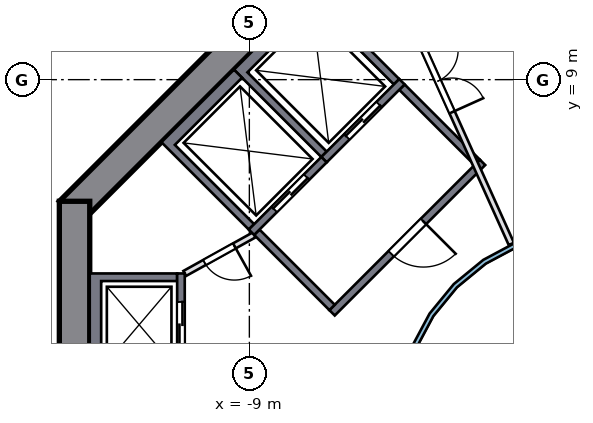
"""IFC4 building model, lengths in metres.
Left out: names, types, materials, properties, quantities, classifications, styles, units other than length and angle.
Written with IfcOpenShell. Run it as: python <this file> out.ifc"""

import sys

from ifc_helpers import new_model, si_unit, direction, frame, frame_2d, origin, place, context, subcontext, project, spatial, polyline, rectangle, outline, extrude, element, fill, save


model = new_model("IFC4")
c1 = context("Model", 3, precision=1e-05, world=origin(), true_north=direction((0.0, 1.0)))
c2 = subcontext(c1, "Body", "Model", "MODEL_VIEW")
j1 = project(units=[si_unit("LENGTHUNIT", "METRE"), si_unit("PLANEANGLEUNIT", "RADIAN")], contexts=[c1])
p1 = place(None, origin())
s1 = spatial("IfcSite", under=j1, at=p1, CompositionType="ELEMENT")
p2 = place(p1, origin())
s2 = spatial("IfcBuilding", under=s1, at=p2, CompositionType="ELEMENT")
p3 = place(p2, frame((0.0, 0.0, 86.0)))
s3 = spatial("IfcBuildingStorey", under=s2, at=p3, CompositionType="ELEMENT", Elevation=86.0)
p4 = place(p3, frame((-5.516, 13.717, 0.0), z_axis=(0.0, 0.0, 1.0), x_axis=(-0.707106781, -0.707106781, 0.0)))
e1 = element("IfcWall", 1, at=p4, inside=s3, PredefinedType="SHEAR", context=c2, shape_type="SweptSolid", body=[
    extrude(rectangle(XDim=11.598, YDim=0.8, at=frame_2d((5.799, 0.0))), origin(), (0.0, 0.0, 1.0), 3.5),
])
p5 = place(p3, frame((-13.6, 5.799, 0.0), z_axis=(0.0, 0.0, 1.0), x_axis=(0.0, -1.0, 0.0)))
e2 = element("IfcWall", 2, at=p5, inside=s3, PredefinedType="SHEAR", context=c2, shape_type="SweptSolid", body=[
    extrude(rectangle(XDim=11.598, YDim=0.8, at=frame_2d((5.799, 0.0))), origin(), (0.0, 0.0, 1.0), 3.5),
])
p6 = place(p5, frame((4.899, 0.0, 0.0)))
e3 = element("IfcOpeningElement", 3, at=p6, cuts=e2, PredefinedType="OPENING", context=c2, shape_type="SweptSolid", body=[
    extrude(rectangle(XDim=1.8, YDim=2.1, at=frame_2d((0.9, 1.05))), frame((0.0, 0.41, 0.0), z_axis=(0.0, -1.0, 0.0), x_axis=(1.0, 0.0, 0.0)), (0.0, 0.0, 1.0), 0.82),
])
p7 = place(p3, origin())
e4 = element("IfcWall", 4, at=p7, inside=s3, PredefinedType="SOLIDWALL", context=c2, shape_type="SweptSolid", body=[
    extrude(outline(polyline([(-13.2, 3.9), (-10.9, 3.9), (-10.9, 3.7), (-12.9, 3.7), (-12.9, 1.4), (-10.9, 1.4), (-10.9, 1.2), (-13.2, 1.2), (-13.2, 3.9)])), origin(), (0.0, 0.0, 1.0), 3.19),
])
p8 = place(p3, frame((-10.8, 1.2, 0.0), z_axis=(0.0, 0.0, 1.0), x_axis=(0.0, 1.0, 0.0)))
e5 = element("IfcWall", 5, at=p8, inside=s3, PredefinedType="SOLIDWALL", context=c2, shape_type="SweptSolid", body=[
    extrude(rectangle(XDim=2.7, YDim=0.2, at=frame_2d((1.35, 0.0))), origin(), (0.0, 0.0, 1.0), 3.19),
])
p9 = place(p8, frame((0.75, 0.0, 0.0)))
e6 = element("IfcOpeningElement", 6, at=p9, cuts=e5, PredefinedType="OPENING", context=c2, shape_type="SweptSolid", body=[
    extrude(rectangle(XDim=1.2, YDim=2.1, at=frame_2d((0.6, 1.05))), frame((0.0, 0.11, 0.0), z_axis=(0.0, -1.0, 0.0), x_axis=(1.0, 0.0, 0.0)), (0.0, 0.0, 1.0), 0.22),
])
p10 = place(p3, origin())
e7 = element("IfcWall", 7, at=p10, inside=s3, PredefinedType="SOLIDWALL", context=c2, shape_type="SweptSolid", body=[
    extrude(outline(polyline([(-9.405, 9.263), (-7.354, 11.314), (-5.056, 9.016), (-5.197, 8.874), (-7.283, 10.96), (-9.051, 9.192), (-6.965, 7.106), (-7.106, 6.965), (-9.405, 9.263)])), origin(), (0.0, 0.0, 1.0), 3.19),
])
p11 = place(p3, frame((-4.985, 8.945, 0.0), z_axis=(0.0, 0.0, 1.0), x_axis=(-0.707106781, -0.707106781, 0.0)))
e8 = element("IfcWall", 8, at=p11, inside=s3, PredefinedType="SOLIDWALL", context=c2, shape_type="SweptSolid", body=[
    extrude(rectangle(XDim=2.9, YDim=0.2, at=frame_2d((1.45, 0.0))), origin(), (0.0, 0.0, 1.0), 3.19),
])
p12 = place(p11, frame((0.85, 0.0, 0.0)))
e9 = element("IfcOpeningElement", 9, at=p12, cuts=e8, PredefinedType="OPENING", context=c2, shape_type="SweptSolid", body=[
    extrude(rectangle(XDim=1.2, YDim=2.1, at=frame_2d((0.6, 1.05))), frame((0.0, 0.11, 0.0), z_axis=(0.0, -1.0, 0.0), x_axis=(1.0, 0.0, 0.0)), (0.0, 0.0, 1.0), 0.22),
])
p13 = place(p3, origin())
e10 = element("IfcWall", 10, at=p13, inside=s3, PredefinedType="SOLIDWALL", context=c2, shape_type="SweptSolid", body=[
    extrude(outline(polyline([(-11.314, 7.354), (-9.405, 9.263), (-9.192, 9.051), (-10.96, 7.283), (-8.874, 5.197), (-9.016, 5.056), (-11.314, 7.354)])), origin(), (0.0, 0.0, 1.0), 3.19),
])
p14 = place(p3, frame((-7.036, 6.894, 0.0), z_axis=(0.0, 0.0, 1.0), x_axis=(-0.707106781, -0.707106781, 0.0)))
e11 = element("IfcWall", 11, at=p14, inside=s3, PredefinedType="SOLIDWALL", context=c2, shape_type="SweptSolid", body=[
    extrude(rectangle(XDim=2.7, YDim=0.2, at=frame_2d((1.35, 0.0))), origin(), (0.0, 0.0, 1.0), 3.19),
])
p15 = place(p14, frame((0.65, 0.0, 0.0)))
e12 = element("IfcOpeningElement", 12, at=p15, cuts=e11, PredefinedType="OPENING", context=c2, shape_type="SweptSolid", body=[
    extrude(rectangle(XDim=1.2, YDim=2.1, at=frame_2d((0.6, 1.05))), frame((0.0, 0.11, 0.0), z_axis=(0.0, -1.0, 0.0), x_axis=(1.0, 0.0, 0.0)), (0.0, 0.0, 1.0), 0.22),
])
p16 = place(p3, frame((-2.864, 6.823, 0.0), z_axis=(0.0, 0.0, 1.0), x_axis=(-0.707106781, -0.707106781, 0.0)))
e13 = element("IfcWall", 13, at=p16, inside=s3, PredefinedType="SOLIDWALL", context=c2, shape_type="SweptSolid", body=[
    extrude(rectangle(XDim=5.6, YDim=0.2, at=frame_2d((2.8, 0.0))), origin(), (0.0, 0.0, 1.0), 3.19),
])
p17 = place(p16, frame((2.2, 0.0, 0.0)))
e14 = element("IfcOpeningElement", 14, at=p17, cuts=e13, PredefinedType="OPENING", context=c2, shape_type="SweptSolid", body=[
    extrude(rectangle(XDim=1.2, YDim=2.1, at=frame_2d((0.6, 1.05))), frame((0.0, 0.11, 0.0), z_axis=(0.0, -1.0, 0.0), x_axis=(1.0, 0.0, 0.0)), (0.0, 0.0, 1.0), 0.22),
])
for number, where, z_axis, x_axis in (
    (15, (-3.005, 6.823, 0.0), (0.0, 0.0, 1.0), (-0.707, 0.707, 0.0)),
    (16, (-6.823, 3.005, 0.0), (0.0, 0.0, 1.0), (-0.707, 0.707, 0.0)),
):
    element("IfcWall", number, at=place(p3, frame(where, z_axis=z_axis, x_axis=x_axis)), inside=s3, PredefinedType="SOLIDWALL", context=c2, shape_type="SweptSolid", body=[
        extrude(rectangle(XDim=2.8, YDim=0.2, at=frame_2d((1.4, 0.0))), origin(), (0.0, 0.0, 1.0), 3.19),
    ])
p18 = place(p3, frame((-8.874, 4.914, 0.0), z_axis=(0.0, 0.0, 1.0), x_axis=(-0.874129705, -0.485692555, 0.0)))
e17 = element("IfcWall", 17, at=p18, inside=s3, PredefinedType="PARTITIONING", context=c2, shape_type="SweptSolid", body=[
    extrude(rectangle(XDim=2.089, YDim=0.15, at=frame_2d((1.044, 0.0))), origin(), (0.0, 0.0, 1.0), 3.19),
])
p19 = place(p18, frame((0.594, 0.0, 0.0)))
e18 = element("IfcOpeningElement", 18, at=p19, cuts=e17, PredefinedType="OPENING", context=c2, shape_type="SweptSolid", body=[
    extrude(rectangle(XDim=0.9, YDim=2.1, at=frame_2d((0.45, 1.05))), frame((0.0, 0.085, 0.0), z_axis=(0.0, -1.0, 0.0), x_axis=(1.0, 0.0, 0.0)), (0.0, 0.0, 1.0), 0.17),
])
p20 = place(p3, frame((-5.784, 12.844, 0.0), z_axis=(0.0, 0.0, 1.0), x_axis=(0.41058002, -0.91182457, 0.0)))
e19 = element("IfcWall", 19, at=p20, inside=s3, PredefinedType="PARTITIONING", context=c2, shape_type="SweptSolid", body=[
    extrude(rectangle(XDim=8.956, YDim=0.15, at=frame_2d((4.478, 0.0))), origin(), (0.0, 0.0, 1.0), 3.19),
])
p21 = place(p20, frame((3.356, 0.0, 0.0)))
e20 = element("IfcOpeningElement", 20, at=p21, cuts=e19, PredefinedType="OPENING", context=c2, shape_type="SweptSolid", body=[
    extrude(rectangle(XDim=1.8, YDim=2.1, at=frame_2d((0.9, 1.05))), frame((0.0, 0.085, 0.0), z_axis=(0.0, -1.0, 0.0), x_axis=(1.0, 0.0, 0.0)), (0.0, 0.0, 1.0), 0.17),
])
p22 = place(p3, origin())
e21 = element("IfcWall", 21, at=p22, inside=s3, PredefinedType="SOLIDWALL", context=c2, shape_type="SweptSolid", body=[
    extrude(outline(polyline([(5.021, -0.999), (4.73, -1.959), (4.257, -2.844), (3.62, -3.62), (2.844, -4.257), (1.959, -4.73), (0.999, -5.021), (0.0, -5.12), (-0.999, -5.021), (-1.959, -4.73), (-2.844, -4.257), (-3.62, -3.62), (-4.257, -2.844), (-4.73, -1.959), (-5.021, -0.999), (-5.12, 0.0), (-5.021, 0.999), (-4.73, 1.959), (-4.257, 2.844), (-3.62, 3.62), (-2.844, 4.257), (-1.959, 4.73), (-0.999, 5.021), (0.0, 5.12), (0.999, 5.021), (1.959, 4.73), (2.844, 4.257), (3.62, 3.62), (4.257, 2.844), (4.73, 1.959), (5.021, 0.999), (5.12, 0.0), (5.021, -0.999)]), holes=[polyline([(4.904, 0.976), (4.619, 1.913), (4.157, 2.778), (3.535, 3.535), (2.778, 4.157), (1.913, 4.619), (0.976, 4.904), (0.0, 5.0), (-0.976, 4.904), (-1.913, 4.619), (-2.778, 4.157), (-3.535, 3.535), (-4.157, 2.778), (-4.619, 1.913), (-4.904, 0.976), (-5.0, 0.0), (-4.904, -0.976), (-4.619, -1.913), (-4.157, -2.778), (-3.535, -3.535), (-2.778, -4.157), (-1.913, -4.619), (-0.976, -4.904), (0.0, -5.0), (0.976, -4.904), (1.913, -4.619), (2.778, -4.157), (3.535, -3.535), (4.157, -2.778), (4.619, -1.913), (4.904, -0.976), (5.0, 0.0), (4.904, 0.976)])]), origin(), (0.0, 0.0, 1.0), 3.19),
])
p23 = place(p9, origin())
e22 = element("IfcDoor", 22, at=p23, inside=s3, OperationType="DOUBLE_DOOR_SLIDING", PredefinedType="DOOR", context=c2, shape_type="SweptSolid", body=[
    extrude(rectangle(XDim=1.2, YDim=2.1, at=frame_2d((0.6, 1.05))), frame((0.0, 0.025, 0.0), z_axis=(0.0, -1.0, 0.0), x_axis=(1.0, 0.0, 0.0)), (0.0, 0.0, 1.0), 0.05),
])
fill(e6, e22)
p24 = place(p12, origin())
e23 = element("IfcDoor", 23, at=p24, inside=s3, OperationType="DOUBLE_DOOR_SLIDING", PredefinedType="DOOR", context=c2, shape_type="SweptSolid", body=[
    extrude(rectangle(XDim=1.2, YDim=2.1, at=frame_2d((0.6, 1.05))), frame((0.0, 0.025, 0.0), z_axis=(0.0, -1.0, 0.0), x_axis=(1.0, 0.0, 0.0)), (0.0, 0.0, 1.0), 0.05),
])
fill(e9, e23)
p25 = place(p15, origin())
e24 = element("IfcDoor", 24, at=p25, inside=s3, OperationType="DOUBLE_DOOR_SLIDING", PredefinedType="DOOR", context=c2, shape_type="SweptSolid", body=[
    extrude(rectangle(XDim=1.2, YDim=2.1, at=frame_2d((0.6, 1.05))), frame((0.0, 0.025, 0.0), z_axis=(0.0, -1.0, 0.0), x_axis=(1.0, 0.0, 0.0)), (0.0, 0.0, 1.0), 0.05),
])
fill(e12, e24)
p26 = place(p17, origin())
e25 = element("IfcDoor", 25, at=p26, inside=s3, OperationType="SINGLE_SWING_LEFT", PredefinedType="DOOR", context=c2, shape_type="SweptSolid", body=[
    extrude(rectangle(XDim=1.2, YDim=2.1, at=frame_2d((0.6, 1.05))), frame((0.0, 0.025, 0.0), z_axis=(0.0, -1.0, 0.0), x_axis=(1.0, 0.0, 0.0)), (0.0, 0.0, 1.0), 0.05),
])
fill(e14, e25)
p27 = place(p19, origin())
e26 = element("IfcDoor", 26, at=p27, inside=s3, OperationType="SINGLE_SWING_LEFT", PredefinedType="DOOR", context=c2, shape_type="SweptSolid", body=[
    extrude(rectangle(XDim=0.9, YDim=2.1, at=frame_2d((0.45, 1.05))), frame((0.0, 0.025, 0.0), z_axis=(0.0, -1.0, 0.0), x_axis=(1.0, 0.0, 0.0)), (0.0, 0.0, 1.0), 0.05),
])
fill(e18, e26)
p28 = place(p21, origin())
e27 = element("IfcDoor", 27, at=p28, inside=s3, OperationType="DOUBLE_DOOR_SINGLE_SWING", PredefinedType="DOOR", context=c2, shape_type="SweptSolid", body=[
    extrude(rectangle(XDim=1.8, YDim=2.1, at=frame_2d((0.9, 1.05))), frame((0.0, 0.025, 0.0), z_axis=(0.0, -1.0, 0.0), x_axis=(1.0, 0.0, 0.0)), (0.0, 0.0, 1.0), 0.05),
])
fill(e20, e27)
save(model, sys.argv[1])
